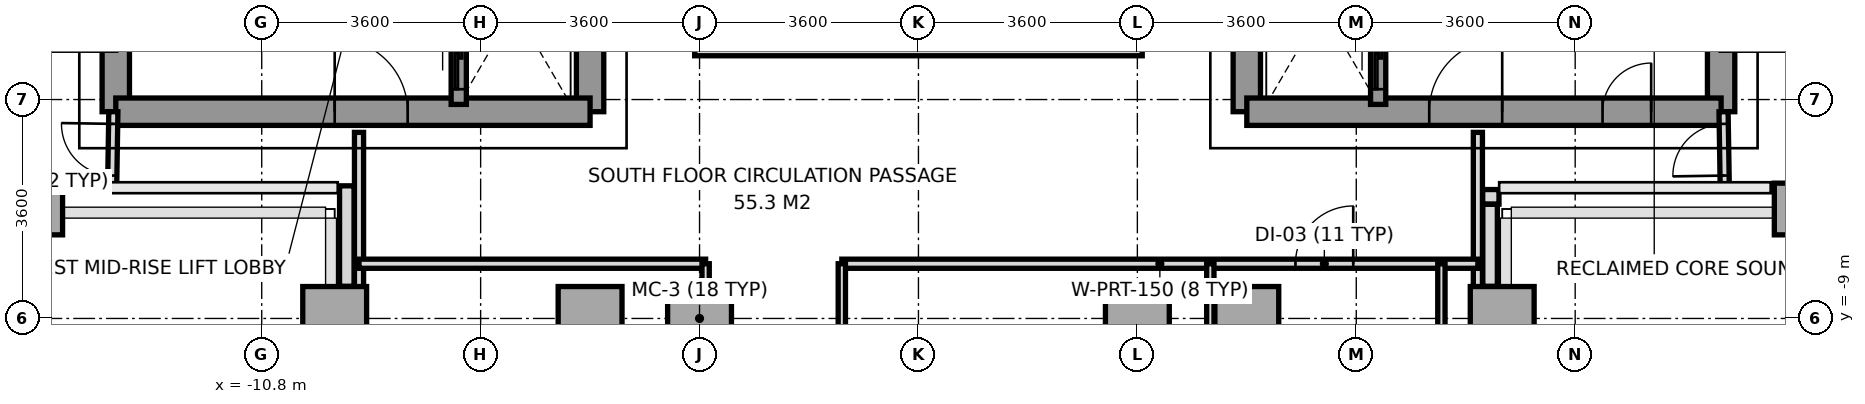
"""IFC4 building model, lengths in metres.
Left out: names, types, materials, properties, quantities, classifications, styles, units other than length and angle.
Written with IfcOpenShell. Run it as: python <this file> out.ifc"""

import sys

from ifc_helpers import new_model, si_unit, direction, frame, frame_2d, origin, origin_2d, place, context, subcontext, project, spatial, rectangle, extrude, source, transform, mapped, element, fill, save


model = new_model("IFC4")
c1 = context("Model", 3, precision=1e-05, world=origin(), true_north=direction((0.0, 1.0)))
c2 = subcontext(c1, "Body", "Model", "MODEL_VIEW")
j1 = project(units=[si_unit("LENGTHUNIT", "METRE"), si_unit("PLANEANGLEUNIT", "RADIAN")], contexts=[c1])
p1 = place(None, origin())
s1 = spatial("IfcSite", under=j1, at=p1, CompositionType="ELEMENT")
p2 = place(p1, origin())
s2 = spatial("IfcBuilding", under=s1, at=p2, CompositionType="ELEMENT")
p3 = place(p2, frame((0.0, 0.0, 131.2)))
s3 = spatial("IfcBuildingStorey", under=s2, at=p3, CompositionType="ELEMENT", Elevation=131.2)
m1 = source(origin(), c2, "Body", "SweptSolid", [
    extrude(rectangle(XDim=0.65, YDim=0.85, at=origin_2d()), origin(), (0.0, 0.0, 1.0), 3.2),
])
p4 = place(p3, frame((-14.4, -7.2, 0.0), z_axis=(0.0, 0.0, 1.0), x_axis=(1.0, 0.0, 0.0)))
e1 = element("IfcColumn", 1, at=p4, inside=s3, PredefinedType="COLUMN", context=c2, shape_type="MappedRepresentation", body=[
    mapped(m1, transform((0.0, 0.0, 0.0), x_axis=(1.0, 0.0, 0.0), y_axis=(0.0, 1.0, 0.0), z_axis=(0.0, 0.0, 1.0), scale=1.0)),
])
m2 = source(origin(), c2, "Body", "SweptSolid", [
    extrude(rectangle(XDim=1.05, YDim=1.05, at=origin_2d()), origin(), (0.0, 0.0, 1.0), 3.2),
])
for number, where, z_axis, x_axis in (
    (2, (-9.6, -9.0, 0.0), (0.0, 0.0, 1.0), (1.0, 0.0, 0.0)),
    (3, (-5.4, -9.0, 0.0), (0.0, 0.0, 1.0), (1.0, 0.0, 0.0)),
    (4, (-3.6, -9.0, 0.0), (0.0, 0.0, 1.0), (1.0, 0.0, 0.0)),
    (5, (3.6, -9.0, 0.0), (0.0, 0.0, 1.0), (1.0, 0.0, 0.0)),
    (6, (5.4, -9.0, 0.0), (0.0, 0.0, 1.0), (1.0, 0.0, 0.0)),
    (7, (9.6, -9.0, 0.0), (0.0, 0.0, 1.0), (1.0, 0.0, 0.0)),
):
    element("IfcColumn", number, at=place(p3, frame(where, z_axis=z_axis, x_axis=x_axis)), inside=s3, PredefinedType="COLUMN", context=c2, shape_type="MappedRepresentation", body=[
        mapped(m2, transform((0.0, 0.0, 0.0), x_axis=(1.0, 0.0, 0.0), y_axis=(0.0, 1.0, 0.0), z_axis=(0.0, 0.0, 1.0), scale=1.0)),
    ])
p5 = place(p3, frame((14.4, -7.2, 0.0), z_axis=(0.0, 0.0, 1.0), x_axis=(1.0, 0.0, 0.0)))
e8 = element("IfcColumn", 8, at=p5, inside=s3, PredefinedType="COLUMN", context=c2, shape_type="MappedRepresentation", body=[
    mapped(m1, transform((0.0, 0.0, 0.0), x_axis=(1.0, 0.0, 0.0), y_axis=(0.0, 1.0, 0.0), z_axis=(0.0, 0.0, 1.0), scale=1.0)),
])
p6 = place(p3, frame((9.547, -7.0, 0.0), z_axis=(0.0, 0.0, 1.0), x_axis=(-1.0, 0.0, 0.0)))
e9 = element("IfcWall", 9, at=p6, inside=s3, PredefinedType="PARAPET", context=c2, shape_type="SweptSolid", body=[
    extrude(rectangle(XDim=0.269, YDim=0.24, at=frame_2d((0.135, 0.0))), origin(), (0.0, 0.0, 1.0), 1.15),
])
p7 = place(p3, frame((9.4, -7.123, 0.0), z_axis=(0.0, 0.0, 1.0), x_axis=(0.0, -1.0, 0.0)))
e10 = element("IfcWall", 10, at=p7, inside=s3, PredefinedType="PARAPET", context=c2, shape_type="SweptSolid", body=[
    extrude(rectangle(XDim=1.349, YDim=0.24, at=frame_2d((0.674, 0.0))), origin(), (0.0, 0.0, 1.0), 1.15),
])
p8 = place(p3, frame((-9.4, -8.472, 0.0), z_axis=(0.0, 0.0, 1.0), x_axis=(0.0, 1.0, 0.0)))
e11 = element("IfcWall", 11, at=p8, inside=s3, PredefinedType="PARAPET", context=c2, shape_type="SweptSolid", body=[
    extrude(rectangle(XDim=1.653, YDim=0.24, at=frame_2d((0.827, 0.0))), origin(), (0.0, 0.0, 1.0), 1.15),
])
p9 = place(p3, frame((-13.2, -5.6, 0.0), z_axis=(0.0, 0.0, 1.0), x_axis=(0.0, 1.0, 0.0)))
e12 = element("IfcWall", 12, at=p9, inside=s3, PredefinedType="SHEAR", context=c2, shape_type="SweptSolid", body=[
    extrude(rectangle(XDim=11.2, YDim=0.45, at=frame_2d((5.6, 0.0))), origin(), (0.0, 0.0, 1.0), 3.2),
])
p10 = place(p3, frame((-5.4, -5.6, 0.0), z_axis=(0.0, 0.0, 1.0), x_axis=(0.0, 1.0, 0.0)))
e13 = element("IfcWall", 13, at=p10, inside=s3, PredefinedType="SHEAR", context=c2, shape_type="SweptSolid", body=[
    extrude(rectangle(XDim=12.5, YDim=0.45, at=frame_2d((6.25, 0.0))), origin(), (0.0, 0.0, 1.0), 3.2),
])
p11 = place(p10, frame((4.55, 0.0, 0.0)))
e14 = element("IfcOpeningElement", 14, at=p11, cuts=e13, PredefinedType="OPENING", context=c2, shape_type="SweptSolid", body=[
    extrude(rectangle(XDim=1.2, YDim=2.2, at=frame_2d((0.6, 1.1))), frame((0.0, 0.235, 0.0), z_axis=(0.0, -1.0, 0.0), x_axis=(1.0, 0.0, 0.0)), (0.0, 0.0, 1.0), 0.47),
])
p12 = place(p3, frame((-13.2, -5.6, 0.0), z_axis=(0.0, 0.0, 1.0), x_axis=(1.0, 0.0, 0.0)))
e15 = element("IfcWall", 15, at=p12, inside=s3, PredefinedType="SHEAR", context=c2, shape_type="SweptSolid", body=[
    extrude(rectangle(XDim=7.8, YDim=0.45, at=frame_2d((3.9, 0.0))), origin(), (0.0, 0.0, 1.0), 3.2),
])
p13 = place(p12, frame((3.6, 0.0, 0.0)))
e16 = element("IfcOpeningElement", 16, at=p13, cuts=e15, PredefinedType="OPENING", context=c2, shape_type="SweptSolid", body=[
    extrude(rectangle(XDim=1.2, YDim=2.2, at=frame_2d((0.6, 1.1))), frame((0.0, 0.235, 0.0), z_axis=(0.0, -1.0, 0.0), x_axis=(1.0, 0.0, 0.0)), (0.0, 0.0, 1.0), 0.47),
])
p14 = place(p3, frame((13.2, -5.6, 0.0), z_axis=(0.0, 0.0, 1.0), x_axis=(0.0, 1.0, 0.0)))
e17 = element("IfcWall", 17, at=p14, inside=s3, PredefinedType="SHEAR", context=c2, shape_type="SweptSolid", body=[
    extrude(rectangle(XDim=11.2, YDim=0.45, at=frame_2d((5.6, 0.0))), origin(), (0.0, 0.0, 1.0), 3.2),
])
p15 = place(p3, frame((5.4, -5.6, 0.0), z_axis=(0.0, 0.0, 1.0), x_axis=(0.0, 1.0, 0.0)))
e18 = element("IfcWall", 18, at=p15, inside=s3, PredefinedType="SHEAR", context=c2, shape_type="SweptSolid", body=[
    extrude(rectangle(XDim=12.5, YDim=0.45, at=frame_2d((6.25, 0.0))), origin(), (0.0, 0.0, 1.0), 3.2),
])
p16 = place(p15, frame((4.55, 0.0, 0.0)))
e19 = element("IfcOpeningElement", 19, at=p16, cuts=e18, PredefinedType="OPENING", context=c2, shape_type="SweptSolid", body=[
    extrude(rectangle(XDim=1.2, YDim=2.2, at=frame_2d((0.6, 1.1))), frame((0.0, 0.235, 0.0), z_axis=(0.0, -1.0, 0.0), x_axis=(1.0, 0.0, 0.0)), (0.0, 0.0, 1.0), 0.47),
])
p17 = place(p15, frame((7.88, 0.0, 0.0)))
e20 = element("IfcOpeningElement", 20, at=p17, cuts=e18, PredefinedType="OPENING", context=c2, shape_type="SweptSolid", body=[
    extrude(rectangle(XDim=0.8, YDim=2.1, at=frame_2d((0.4, 1.05))), frame((0.0, 0.235, 0.0), z_axis=(0.0, -1.0, 0.0), x_axis=(1.0, 0.0, 0.0)), (0.0, 0.0, 1.0), 0.47),
])
p18 = place(p3, frame((5.4, -5.6, 0.0), z_axis=(0.0, 0.0, 1.0), x_axis=(1.0, 0.0, 0.0)))
e21 = element("IfcWall", 21, at=p18, inside=s3, PredefinedType="SHEAR", context=c2, shape_type="SweptSolid", body=[
    extrude(rectangle(XDim=7.8, YDim=0.45, at=frame_2d((3.9, 0.0))), origin(), (0.0, 0.0, 1.0), 3.2),
])
p19 = place(p18, frame((3.0, 0.0, 0.0)))
e22 = element("IfcOpeningElement", 22, at=p19, cuts=e21, PredefinedType="OPENING", context=c2, shape_type="SweptSolid", body=[
    extrude(rectangle(XDim=1.2, YDim=2.2, at=frame_2d((0.6, 1.1))), frame((0.0, 0.235, 0.0), z_axis=(0.0, -1.0, 0.0), x_axis=(1.0, 0.0, 0.0)), (0.0, 0.0, 1.0), 0.47),
])
p20 = place(p18, frame((5.85, 0.0, 0.0)))
e23 = element("IfcOpeningElement", 23, at=p20, cuts=e21, PredefinedType="OPENING", context=c2, shape_type="SweptSolid", body=[
    extrude(rectangle(XDim=0.8, YDim=2.1, at=frame_2d((0.4, 1.05))), frame((0.0, 0.235, 0.0), z_axis=(0.0, -1.0, 0.0), x_axis=(1.0, 0.0, 0.0)), (0.0, 0.0, 1.0), 0.47),
])
p21 = place(p3, frame((-7.56, -5.48, 0.0), z_axis=(0.0, 0.0, 1.0), x_axis=(0.0, 1.0, 0.0)))
e24 = element("IfcWall", 24, at=p21, inside=s3, PredefinedType="SOLIDWALL", context=c2, shape_type="SweptSolid", body=[
    extrude(rectangle(XDim=1.6, YDim=0.25, at=frame_2d((0.8, 0.0))), origin(), (0.0, 0.0, 1.0), 3.2),
])
p22 = place(p21, frame((0.25, 0.0, 0.0)))
e25 = element("IfcOpeningElement", 25, at=p22, cuts=e24, PredefinedType="OPENING", context=c2, shape_type="SweptSolid", body=[
    extrude(rectangle(XDim=1.1, YDim=2.2, at=frame_2d((0.55, 1.1))), frame((0.0, 0.135, 0.0), z_axis=(0.0, -1.0, 0.0), x_axis=(1.0, 0.0, 0.0)), (0.0, 0.0, 1.0), 0.27),
])
p23 = place(p3, frame((7.56, -5.48, 0.0), z_axis=(0.0, 0.0, 1.0), x_axis=(0.0, 1.0, 0.0)))
e26 = element("IfcWall", 26, at=p23, inside=s3, PredefinedType="SOLIDWALL", context=c2, shape_type="SweptSolid", body=[
    extrude(rectangle(XDim=1.6, YDim=0.25, at=frame_2d((0.8, 0.0))), origin(), (0.0, 0.0, 1.0), 3.2),
])
p24 = place(p23, frame((0.25, 0.0, 0.0)))
e27 = element("IfcOpeningElement", 27, at=p24, cuts=e26, PredefinedType="OPENING", context=c2, shape_type="SweptSolid", body=[
    extrude(rectangle(XDim=1.1, YDim=2.2, at=frame_2d((0.55, 1.1))), frame((0.0, 0.135, 0.0), z_axis=(0.0, -1.0, 0.0), x_axis=(1.0, 0.0, 0.0)), (0.0, 0.0, 1.0), 0.27),
])
for number, where, z_axis, x_axis in (
    (28, (-9.2, -15.68, 0.0), (0.0, 0.0, 1.0), (0.0, 1.0, 0.0)),
    (29, (9.2, -15.68, 0.0), (0.0, 0.0, 1.0), (0.0, 1.0, 0.0)),
):
    element("IfcWall", number, at=place(p3, frame(where, z_axis=z_axis, x_axis=x_axis)), inside=s3, PredefinedType="PARTITIONING", context=c2, shape_type="SweptSolid", body=[
        extrude(rectangle(XDim=9.74, YDim=0.15, at=frame_2d((4.87, 0.0))), origin(), (0.0, 0.0, 1.0), 2.7),
    ])
p25 = place(p3, frame((-9.2, -8.1, 0.0), z_axis=(0.0, 0.0, 1.0), x_axis=(1.0, 0.0, 0.0)))
e30 = element("IfcWall", 30, at=p25, inside=s3, PredefinedType="PARTITIONING", context=c2, shape_type="SweptSolid", body=[
    extrude(rectangle(XDim=5.7, YDim=0.15, at=frame_2d((2.85, 0.0))), origin(), (0.0, 0.0, 1.0), 2.76),
])
p26 = place(p3, frame((-1.26, -8.1, 0.0), z_axis=(0.0, 0.0, 1.0), x_axis=(1.0, 0.0, 0.0)))
e31 = element("IfcWall", 31, at=p26, inside=s3, PredefinedType="PARTITIONING", context=c2, shape_type="SweptSolid", body=[
    extrude(rectangle(XDim=10.46, YDim=0.15, at=frame_2d((5.23, 0.0))), origin(), (0.0, 0.0, 1.0), 2.76),
])
p27 = place(p26, frame((7.46, 0.0, 0.0)))
e32 = element("IfcOpeningElement", 32, at=p27, cuts=e31, PredefinedType="OPENING", context=c2, shape_type="SweptSolid", body=[
    extrude(rectangle(XDim=0.95, YDim=2.15, at=frame_2d((0.475, 1.075))), frame((0.0, 0.085, 0.0), z_axis=(0.0, -1.0, 0.0), x_axis=(1.0, 0.0, 0.0)), (0.0, 0.0, 1.0), 0.17),
])
p28 = place(p3, frame((-3.5, -19.3, 0.0), z_axis=(0.0, 0.0, 1.0), x_axis=(0.0, 1.0, 0.0)))
e33 = element("IfcWall", 33, at=p28, inside=s3, PredefinedType="PARTITIONING", context=c2, shape_type="SweptSolid", body=[
    extrude(rectangle(XDim=11.2, YDim=0.12, at=frame_2d((5.6, 0.0))), origin(), (0.0, 0.0, 1.0), 2.7),
])
p29 = place(p28, frame((7.9, 0.0, 0.0)))
e34 = element("IfcOpeningElement", 34, at=p29, cuts=e33, PredefinedType="OPENING", context=c2, shape_type="SweptSolid", body=[
    extrude(rectangle(XDim=0.95, YDim=2.15, at=frame_2d((0.475, 1.075))), frame((0.0, 0.07, 0.0), z_axis=(0.0, -1.0, 0.0), x_axis=(1.0, 0.0, 0.0)), (0.0, 0.0, 1.0), 0.14),
])
p30 = place(p28, frame((4.5, 0.0, 0.0)))
e35 = element("IfcOpeningElement", 35, at=p30, cuts=e33, PredefinedType="OPENING", context=c2, shape_type="SweptSolid", body=[
    extrude(rectangle(XDim=0.95, YDim=2.15, at=frame_2d((0.475, 1.075))), frame((0.0, 0.07, 0.0), z_axis=(0.0, -1.0, 0.0), x_axis=(1.0, 0.0, 0.0)), (0.0, 0.0, 1.0), 0.14),
])
p31 = place(p28, frame((1.0, 0.0, 0.0)))
e36 = element("IfcOpeningElement", 36, at=p31, cuts=e33, PredefinedType="OPENING", context=c2, shape_type="SweptSolid", body=[
    extrude(rectangle(XDim=0.95, YDim=2.15, at=frame_2d((0.475, 1.075))), frame((0.0, 0.07, 0.0), z_axis=(0.0, -1.0, 0.0), x_axis=(1.0, 0.0, 0.0)), (0.0, 0.0, 1.0), 0.14),
])
p32 = place(p3, frame((-1.26, -19.3, 0.0), z_axis=(0.0, 0.0, 1.0), x_axis=(0.0, 1.0, 0.0)))
e37 = element("IfcWall", 37, at=p32, inside=s3, PredefinedType="PARTITIONING", context=c2, shape_type="SweptSolid", body=[
    extrude(rectangle(XDim=11.2, YDim=0.12, at=frame_2d((5.6, 0.0))), origin(), (0.0, 0.0, 1.0), 2.7),
])
p33 = place(p32, frame((1.8, 0.0, 0.0)))
e38 = element("IfcOpeningElement", 38, at=p33, cuts=e37, PredefinedType="OPENING", context=c2, shape_type="SweptSolid", body=[
    extrude(rectangle(XDim=1.1, YDim=2.2, at=frame_2d((0.55, 1.1))), frame((0.0, 0.07, 0.0), z_axis=(0.0, -1.0, 0.0), x_axis=(1.0, 0.0, 0.0)), (0.0, 0.0, 1.0), 0.14),
])
p34 = place(p3, frame((4.8, -11.5, 0.0), z_axis=(0.0, 0.0, 1.0), x_axis=(0.0, 1.0, 0.0)))
e39 = element("IfcWall", 39, at=p34, inside=s3, PredefinedType="PARTITIONING", context=c2, shape_type="SweptSolid", body=[
    extrude(rectangle(XDim=3.4, YDim=0.12, at=frame_2d((1.7, 0.0))), origin(), (0.0, 0.0, 1.0), 3.2),
])
p35 = place(p3, frame((8.6, -11.5, 0.0), z_axis=(0.0, 0.0, 1.0), x_axis=(0.0, 1.0, 0.0)))
e40 = element("IfcWall", 40, at=p35, inside=s3, PredefinedType="PARTITIONING", context=c2, shape_type="SweptSolid", body=[
    extrude(rectangle(XDim=3.4, YDim=0.12, at=frame_2d((1.7, 0.0))), origin(), (0.0, 0.0, 1.0), 2.7),
])
p36 = place(p3, frame((-13.26, -6.85, 0.0), z_axis=(0.0, 0.0, 1.0), x_axis=(0.016013571389, 0.999871774545, 0.0)))
e41 = element("IfcWall", 41, at=p36, inside=s3, PredefinedType="PARTITIONING", context=c2, shape_type="SweptSolid", body=[
    extrude(rectangle(XDim=1.25, YDim=0.15, at=frame_2d((0.625, 0.0))), origin(), (0.0, 0.0, 1.0), 3.2),
])
p37 = place(p36, frame((0.2, 0.0, 0.0)))
e42 = element("IfcOpeningElement", 42, at=p37, cuts=e41, PredefinedType="OPENING", context=c2, shape_type="SweptSolid", body=[
    extrude(rectangle(XDim=0.85, YDim=2.1, at=frame_2d((0.425, 1.05))), frame((0.0, 0.085, 0.0), z_axis=(0.0, -1.0, 0.0), x_axis=(1.0, 0.0, 0.0)), (0.0, 0.0, 1.0), 0.17),
])
p38 = place(p3, frame((13.26, -6.85, 0.0), z_axis=(0.0, 0.0, 1.0), x_axis=(-0.016013571389, 0.999871774545, 0.0)))
e43 = element("IfcWall", 43, at=p38, inside=s3, PredefinedType="PARTITIONING", context=c2, shape_type="SweptSolid", body=[
    extrude(rectangle(XDim=1.25, YDim=0.15, at=frame_2d((0.625, 0.0))), origin(), (0.0, 0.0, 1.0), 3.2),
])
p39 = place(p38, frame((0.2, 0.0, 0.0)))
e44 = element("IfcOpeningElement", 44, at=p39, cuts=e43, PredefinedType="OPENING", context=c2, shape_type="SweptSolid", body=[
    extrude(rectangle(XDim=0.85, YDim=2.1, at=frame_2d((0.425, 1.05))), frame((0.0, 0.085, 0.0), z_axis=(0.0, -1.0, 0.0), x_axis=(1.0, 0.0, 0.0)), (0.0, 0.0, 1.0), 0.17),
])
p40 = place(p3, frame((-3.68, -4.56, 0.0), z_axis=(0.0, 0.0, 1.0), x_axis=(1.0, 0.0, 0.0)))
e45 = element("IfcWall", 45, at=p40, inside=s3, PredefinedType="PARAPET", context=c2, shape_type="SweptSolid", body=[
    extrude(rectangle(XDim=7.36, YDim=0.24, at=frame_2d((3.68, 0.0))), origin(), (0.0, 0.0, 1.0), 1.15),
])
m3 = source(origin(), c2, "Body", "SweptSolid", [
    extrude(rectangle(XDim=1.2, YDim=2.2, at=frame_2d((0.6, 1.1))), frame((0.0, 0.025, 0.0), z_axis=(0.0, -1.0, 0.0), x_axis=(1.0, 0.0, 0.0)), (0.0, 0.0, 1.0), 0.05),
])
p41 = place(p13, origin())
e46 = element("IfcDoor", 46, at=p41, inside=s3, OperationType="SINGLE_SWING_LEFT", PredefinedType="DOOR", context=c2, shape_type="MappedRepresentation", body=[
    mapped(m3, transform((0.0, 0.0, 0.0), x_axis=(1.0, 0.0, 0.0), y_axis=(0.0, 1.0, 0.0), z_axis=(0.0, 0.0, 1.0), scale=1.0)),
])
fill(e16, e46)
p42 = place(p19, origin())
e47 = element("IfcDoor", 47, at=p42, inside=s3, OperationType="SINGLE_SWING_RIGHT", PredefinedType="DOOR", context=c2, shape_type="MappedRepresentation", body=[
    mapped(m3, transform((0.0, 0.0, 0.0), x_axis=(1.0, 0.0, 0.0), y_axis=(0.0, 1.0, 0.0), z_axis=(0.0, 0.0, 1.0), scale=1.0)),
])
fill(e22, e47)
m4 = source(origin(), c2, "Body", "SweptSolid", [
    extrude(rectangle(XDim=0.8, YDim=2.1, at=frame_2d((0.4, 1.05))), frame((0.0, 0.025, 0.0), z_axis=(0.0, -1.0, 0.0), x_axis=(1.0, 0.0, 0.0)), (0.0, 0.0, 1.0), 0.05),
])
p43 = place(p20, origin())
e48 = element("IfcDoor", 48, at=p43, inside=s3, OperationType="SINGLE_SWING_RIGHT", PredefinedType="DOOR", context=c2, shape_type="MappedRepresentation", body=[
    mapped(m4, transform((0.0, 0.0, 0.0), x_axis=(1.0, 0.0, 0.0), y_axis=(0.0, 1.0, 0.0), z_axis=(0.0, 0.0, 1.0), scale=1.0)),
])
fill(e23, e48)
m5 = source(origin(), c2, "Body", "SweptSolid", [
    extrude(rectangle(XDim=1.1, YDim=2.2, at=frame_2d((0.55, 1.1))), frame((0.0, 0.025, 0.0), z_axis=(0.0, -1.0, 0.0), x_axis=(1.0, 0.0, 0.0)), (0.0, 0.0, 1.0), 0.05),
])
p44 = place(p22, origin())
e49 = element("IfcDoor", 49, at=p44, inside=s3, OperationType="SLIDING_TO_LEFT", PredefinedType="DOOR", context=c2, shape_type="MappedRepresentation", body=[
    mapped(m5, transform((0.0, 0.0, 0.0), x_axis=(1.0, 0.0, 0.0), y_axis=(0.0, 1.0, 0.0), z_axis=(0.0, 0.0, 1.0), scale=1.0)),
])
fill(e25, e49)
p45 = place(p24, origin())
e50 = element("IfcDoor", 50, at=p45, inside=s3, OperationType="SLIDING_TO_LEFT", PredefinedType="DOOR", context=c2, shape_type="MappedRepresentation", body=[
    mapped(m5, transform((0.0, 0.0, 0.0), x_axis=(1.0, 0.0, 0.0), y_axis=(0.0, 1.0, 0.0), z_axis=(0.0, 0.0, 1.0), scale=1.0)),
])
fill(e27, e50)
m6 = source(origin(), c2, "Body", "SweptSolid", [
    extrude(rectangle(XDim=0.95, YDim=2.15, at=frame_2d((0.475, 1.075))), frame((0.0, 0.025, 0.0), z_axis=(0.0, -1.0, 0.0), x_axis=(1.0, 0.0, 0.0)), (0.0, 0.0, 1.0), 0.05),
])
p46 = place(p27, origin())
e51 = element("IfcDoor", 51, at=p46, inside=s3, OperationType="SINGLE_SWING_RIGHT", PredefinedType="DOOR", context=c2, shape_type="MappedRepresentation", body=[
    mapped(m6, transform((0.0, 0.0, 0.0), x_axis=(1.0, 0.0, 0.0), y_axis=(0.0, 1.0, 0.0), z_axis=(0.0, 0.0, 1.0), scale=1.0)),
])
fill(e32, e51)
m7 = source(origin(), c2, "Body", "SweptSolid", [
    extrude(rectangle(XDim=0.85, YDim=2.1, at=frame_2d((0.425, 1.05))), frame((0.0, 0.025, 0.0), z_axis=(0.0, -1.0, 0.0), x_axis=(1.0, 0.0, 0.0)), (0.0, 0.0, 1.0), 0.05),
])
p47 = place(p37, origin())
e52 = element("IfcDoor", 52, at=p47, inside=s3, OperationType="SINGLE_SWING_RIGHT", PredefinedType="DOOR", context=c2, shape_type="MappedRepresentation", body=[
    mapped(m7, transform((0.0, 0.0, 0.0), x_axis=(1.0, 0.0, 0.0), y_axis=(0.0, 1.0, 0.0), z_axis=(0.0, 0.0, 1.0), scale=1.0)),
])
fill(e42, e52)
p48 = place(p39, origin())
e53 = element("IfcDoor", 53, at=p48, inside=s3, OperationType="SINGLE_SWING_LEFT", PredefinedType="DOOR", context=c2, shape_type="MappedRepresentation", body=[
    mapped(m7, transform((0.0, 0.0, 0.0), x_axis=(1.0, 0.0, 0.0), y_axis=(0.0, 1.0, 0.0), z_axis=(0.0, 0.0, 1.0), scale=1.0)),
])
fill(e44, e53)
save(model, sys.argv[1])
